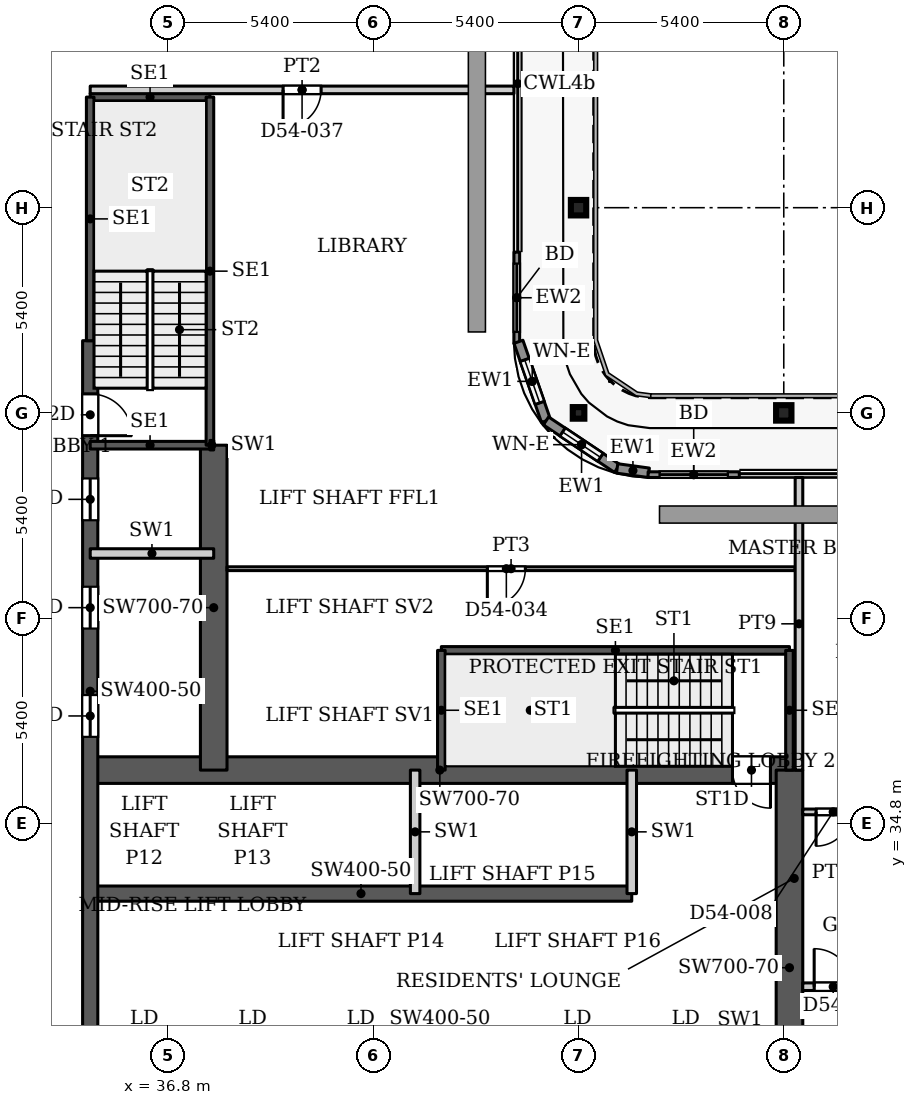
"""IFC4 building model, lengths in metres.
Left out: names, types, materials, properties, quantities, classifications, styles, units other than length and angle.
Written with IfcOpenShell. Run it as: python <this file> out.ifc"""

import sys

from ifc_helpers import new_model, si_unit, direction, frame, frame_2d, origin, origin_2d, place, context, subcontext, project, spatial, rectangle, hollow_rectangle, i_section, extrude, source, transform, mapped, element, fill, save


model = new_model("IFC4")
c1 = context("Model", 3, precision=1e-05, world=origin(), true_north=direction((0.0, 1.0)))
c2 = subcontext(c1, "Body", "Model", "MODEL_VIEW")
j1 = project(units=[si_unit("LENGTHUNIT", "METRE"), si_unit("PLANEANGLEUNIT", "RADIAN")], contexts=[c1])
p1 = place(None, origin())
s1 = spatial("IfcSite", under=j1, at=p1, CompositionType="ELEMENT")
p2 = place(p1, origin())
s2 = spatial("IfcBuilding", under=s1, at=p2, CompositionType="ELEMENT")
p3 = place(p2, frame((0.0, 0.0, 235.7)))
s3 = spatial("IfcBuildingStorey", under=s2, at=p3, CompositionType="ELEMENT", Elevation=235.7)
for number, where, z_axis, x_axis in (
    (1, (53.0, 45.6, 0.0), (0.0, 0.0, 1.0), (1.0, 0.0, 0.0)),
    (2, (47.6, 51.0, 0.0), (0.0, 0.0, 1.0), (1.0, 0.0, 0.0)),
):
    element("IfcColumn", number, at=place(p3, frame(where, z_axis=z_axis, x_axis=x_axis)), inside=s3, PredefinedType="COLUMN", context=c2, shape_type="SweptSolid", body=[
        extrude(i_section(OverallWidth=0.404, OverallDepth=0.407, WebThickness=0.027, FlangeThickness=0.044, FilletRadius=0.012, at=origin_2d()), origin(), (0.0, 0.0, 1.0), 3.9),
    ])
p4 = place(p3, frame((47.6, 45.6, 0.0), z_axis=(0.0, 0.0, 1.0), x_axis=(1.0, 0.0, 0.0)))
e3 = element("IfcColumn", 3, at=p4, inside=s3, PredefinedType="COLUMN", context=c2, shape_type="SweptSolid", body=[
    extrude(hollow_rectangle(XDim=0.305, YDim=0.305, WallThickness=0.016, InnerFilletRadius=0.016, OuterFilletRadius=0.032, at=origin_2d()), origin(), (0.0, 0.0, 1.0), 3.9),
])
p5 = place(p3, frame((34.75, 32.95, 0.0), z_axis=(0.0, 0.0, 1.0), x_axis=(1.0, 0.0, 0.0)))
e4 = element("IfcWall", 4, at=p5, inside=s3, PredefinedType="SHEAR", context=c2, shape_type="SweptSolid", body=[
    extrude(rectangle(XDim=14.25, YDim=0.4, at=frame_2d((7.125, 0.0))), origin(), (0.0, 0.0, 1.0), 3.9),
])
p6 = place(p3, frame((34.75, 36.2, 0.0), z_axis=(0.0, 0.0, 1.0), x_axis=(1.0, 0.0, 0.0)))
e5 = element("IfcWall", 5, at=p6, inside=s3, PredefinedType="SHEAR", context=c2, shape_type="SweptSolid", body=[
    extrude(rectangle(XDim=18.4, YDim=0.7, at=frame_2d((9.2, 0.0))), origin(), (0.0, 0.0, 1.0), 3.9),
])
p7 = place(p6, frame((16.9, 0.0, 0.0)))
e6 = element("IfcOpeningElement", 6, at=p7, cuts=e5, PredefinedType="OPENING", context=c2, shape_type="SweptSolid", body=[
    extrude(rectangle(XDim=1.0, YDim=2.2, at=frame_2d((0.5, 1.1))), frame((0.0, 0.36, 0.0), z_axis=(0.0, -1.0, 0.0), x_axis=(1.0, 0.0, 0.0)), (0.0, 0.0, 1.0), 0.72),
])
p8 = place(p3, frame((34.75, 29.05, 0.0), z_axis=(0.0, 0.0, 1.0), x_axis=(0.0, 1.0, 0.0)))
e7 = element("IfcWall", 7, at=p8, inside=s3, PredefinedType="SHEAR", context=c2, shape_type="SweptSolid", body=[
    extrude(rectangle(XDim=18.45, YDim=0.4, at=frame_2d((9.225, 0.0))), origin(), (0.0, 0.0, 1.0), 3.9),
])
p9 = place(p8, frame((8.025, 0.0, 0.0)))
e8 = element("IfcOpeningElement", 8, at=p9, cuts=e7, PredefinedType="OPENING", context=c2, shape_type="SweptSolid", body=[
    extrude(rectangle(XDim=1.1, YDim=2.2, at=frame_2d((0.55, 1.1))), frame((0.0, 0.21, 0.0), z_axis=(0.0, -1.0, 0.0), x_axis=(1.0, 0.0, 0.0)), (0.0, 0.0, 1.0), 0.42),
])
p10 = place(p8, frame((10.875, 0.0, 0.0)))
e9 = element("IfcOpeningElement", 9, at=p10, cuts=e7, PredefinedType="OPENING", context=c2, shape_type="SweptSolid", body=[
    extrude(rectangle(XDim=1.1, YDim=2.2, at=frame_2d((0.55, 1.1))), frame((0.0, 0.21, 0.0), z_axis=(0.0, -1.0, 0.0), x_axis=(1.0, 0.0, 0.0)), (0.0, 0.0, 1.0), 0.42),
])
p11 = place(p8, frame((13.725, 0.0, 0.0)))
e10 = element("IfcOpeningElement", 10, at=p11, cuts=e7, PredefinedType="OPENING", context=c2, shape_type="SweptSolid", body=[
    extrude(rectangle(XDim=1.1, YDim=2.2, at=frame_2d((0.55, 1.1))), frame((0.0, 0.21, 0.0), z_axis=(0.0, -1.0, 0.0), x_axis=(1.0, 0.0, 0.0)), (0.0, 0.0, 1.0), 0.42),
])
p12 = place(p8, frame((15.95, 0.0, 0.0)))
e11 = element("IfcOpeningElement", 11, at=p12, cuts=e7, PredefinedType="OPENING", context=c2, shape_type="SweptSolid", body=[
    extrude(rectangle(XDim=1.1, YDim=2.2, at=frame_2d((0.55, 1.1))), frame((0.0, 0.21, 0.0), z_axis=(0.0, -1.0, 0.0), x_axis=(1.0, 0.0, 0.0)), (0.0, 0.0, 1.0), 0.42),
])
p13 = place(p3, frame((38.0, 36.2, 0.0), z_axis=(0.0, 0.0, 1.0), x_axis=(0.0, 1.0, 0.0)))
e12 = element("IfcWall", 12, at=p13, inside=s3, PredefinedType="SHEAR", context=c2, shape_type="SweptSolid", body=[
    extrude(rectangle(XDim=8.55, YDim=0.7, at=frame_2d((4.275, 0.0))), origin(), (0.0, 0.0, 1.0), 3.9),
])
p14 = place(p3, frame((53.15, 25.8, 0.0), z_axis=(0.0, 0.0, 1.0), x_axis=(0.0, 1.0, 0.0)))
e13 = element("IfcWall", 13, at=p14, inside=s3, PredefinedType="SHEAR", context=c2, shape_type="SweptSolid", body=[
    extrude(rectangle(XDim=10.4, YDim=0.7, at=frame_2d((5.2, 0.0))), origin(), (0.0, 0.0, 1.0), 3.9),
])
p15 = place(p3, frame((45.975, 49.83, 0.0), z_axis=(0.0, 0.0, 1.0), x_axis=(0.0, -1.0, 0.0)))
e14 = element("IfcWall", 14, at=p15, inside=s3, PredefinedType="SOLIDWALL", context=c2, shape_type="SweptSolid", body=[
    extrude(rectangle(XDim=2.4, YDim=0.15, at=frame_2d((1.2, 0.0))), origin(), (0.0, 0.0, 1.0), 3.75),
])
p16 = place(p15, frame((0.3, 0.0, 0.0)))
e15 = element("IfcOpeningElement", 15, at=p16, cuts=e14, PredefinedType="OPENING", context=c2, shape_type="SweptSolid", body=[
    extrude(rectangle(XDim=1.8, YDim=2.4, at=frame_2d((0.9, 1.2))), frame((0.0, 0.085, 0.0), z_axis=(0.0, -1.0, 0.0), x_axis=(1.0, 0.0, 0.0)), (0.0, 0.0, 1.0), 0.17),
])
p17 = place(p3, frame((46.018, 47.471, 0.0), z_axis=(0.0, 0.0, 1.0), x_axis=(0.328791208903, -0.944402637093, 0.0)))
e16 = element("IfcWall", 16, at=p17, inside=s3, PredefinedType="SOLIDWALL", context=c2, shape_type="SweptSolid", body=[
    extrude(rectangle(XDim=2.205, YDim=0.25, at=frame_2d((1.102, 0.0))), origin(), (0.0, 0.0, 1.0), 3.75),
])
p18 = place(p17, frame((0.503, 0.0, 0.6)))
e17 = element("IfcOpeningElement", 17, at=p18, cuts=e16, PredefinedType="OPENING", context=c2, shape_type="SweptSolid", body=[
    extrude(rectangle(XDim=1.2, YDim=2.1, at=frame_2d((0.6, 1.05))), frame((0.0, 0.135, 0.0), z_axis=(0.0, -1.0, 0.0), x_axis=(1.0, 0.0, 0.0)), (0.0, 0.0, 1.0), 0.27),
])
p19 = place(p3, frame((46.743, 45.389, 0.0), z_axis=(0.0, 0.0, 1.0), x_axis=(0.831449265529, -0.555600682912, 0.0)))
e18 = element("IfcWall", 18, at=p19, inside=s3, PredefinedType="SOLIDWALL", context=c2, shape_type="SweptSolid", body=[
    extrude(rectangle(XDim=2.251, YDim=0.25, at=frame_2d((1.126, 0.0))), origin(), (0.0, 0.0, 1.0), 3.75),
])
p20 = place(p19, frame((0.525, 0.0, 0.6)))
e19 = element("IfcOpeningElement", 19, at=p20, cuts=e18, PredefinedType="OPENING", context=c2, shape_type="SweptSolid", body=[
    extrude(rectangle(XDim=1.2, YDim=2.1, at=frame_2d((0.6, 1.05))), frame((0.0, 0.135, 0.0), z_axis=(0.0, -1.0, 0.0), x_axis=(1.0, 0.0, 0.0)), (0.0, 0.0, 1.0), 0.27),
])
p21 = place(p3, frame((48.615, 44.138, 0.0), z_axis=(0.0, 0.0, 1.0), x_axis=(0.990741504246, -0.135761819977, 0.0)))
e20 = element("IfcWall", 20, at=p21, inside=s3, PredefinedType="SOLIDWALL", context=c2, shape_type="SweptSolid", body=[
    extrude(rectangle(XDim=0.84, YDim=0.25, at=frame_2d((0.42, 0.0))), origin(), (0.0, 0.0, 1.0), 3.75),
])
p22 = place(p3, frame((49.43, 43.975, 0.0), z_axis=(0.0, 0.0, 1.0), x_axis=(1.0, 0.0, 0.0)))
e21 = element("IfcWall", 21, at=p22, inside=s3, PredefinedType="SOLIDWALL", context=c2, shape_type="SweptSolid", body=[
    extrude(rectangle(XDim=2.4, YDim=0.15, at=frame_2d((1.2, 0.0))), origin(), (0.0, 0.0, 1.0), 3.75),
])
p23 = place(p22, frame((0.3, 0.0, 0.0)))
e22 = element("IfcOpeningElement", 22, at=p23, cuts=e21, PredefinedType="OPENING", context=c2, shape_type="SweptSolid", body=[
    extrude(rectangle(XDim=1.8, YDim=2.4, at=frame_2d((0.9, 1.2))), frame((0.0, 0.085, 0.0), z_axis=(0.0, -1.0, 0.0), x_axis=(1.0, 0.0, 0.0)), (0.0, 0.0, 1.0), 0.17),
])
p24 = place(p3, frame((43.99, 39.35, 0.0), z_axis=(0.0, 0.0, 1.0), x_axis=(1.0, 0.0, 0.0)))
e23 = element("IfcWall", 23, at=p24, inside=s3, PredefinedType="SHEAR", context=c2, shape_type="SweptSolid", body=[
    extrude(rectangle(XDim=9.16, YDim=0.2, at=frame_2d((4.58, 0.0))), origin(), (0.0, 0.0, 1.0), 3.9),
])
for number, where, z_axis, x_axis in (
    (24, (43.99, 36.2, 0.0), (0.0, 0.0, 1.0), (0.0, 1.0, 0.0)),
    (25, (53.15, 36.2, 0.0), (0.0, 0.0, 1.0), (0.0, 1.0, 0.0)),
):
    element("IfcWall", number, at=place(p3, frame(where, z_axis=z_axis, x_axis=x_axis)), inside=s3, PredefinedType="SHEAR", context=c2, shape_type="SweptSolid", body=[
        extrude(rectangle(XDim=3.15, YDim=0.2, at=frame_2d((1.575, 0.0))), origin(), (0.0, 0.0, 1.0), 3.9),
    ])
for number, where, z_axis, x_axis in (
    (26, (34.75, 44.75, 0.0), (0.0, 0.0, 1.0), (1.0, 0.0, 0.0)),
    (27, (34.75, 53.91, 0.0), (0.0, 0.0, 1.0), (1.0, 0.0, 0.0)),
):
    element("IfcWall", number, at=place(p3, frame(where, z_axis=z_axis, x_axis=x_axis)), inside=s3, PredefinedType="SHEAR", context=c2, shape_type="SweptSolid", body=[
        extrude(rectangle(XDim=3.15, YDim=0.2, at=frame_2d((1.575, 0.0))), origin(), (0.0, 0.0, 1.0), 3.9),
    ])
p25 = place(p3, frame((34.75, 47.5, 0.0), z_axis=(0.0, 0.0, 1.0), x_axis=(0.0, 1.0, 0.0)))
e28 = element("IfcWall", 28, at=p25, inside=s3, PredefinedType="SHEAR", context=c2, shape_type="SweptSolid", body=[
    extrude(rectangle(XDim=6.41, YDim=0.2, at=frame_2d((3.205, 0.0))), origin(), (0.0, 0.0, 1.0), 3.9),
])
p26 = place(p3, frame((37.9, 44.75, 0.0), z_axis=(0.0, 0.0, 1.0), x_axis=(0.0, 1.0, 0.0)))
e29 = element("IfcWall", 29, at=p26, inside=s3, PredefinedType="SHEAR", context=c2, shape_type="SweptSolid", body=[
    extrude(rectangle(XDim=9.16, YDim=0.2, at=frame_2d((4.58, 0.0))), origin(), (0.0, 0.0, 1.0), 3.9),
])
for number, where, z_axis, x_axis in (
    (30, (43.3, 32.95, 0.0), (0.0, 0.0, 1.0), (0.0, 1.0, 0.0)),
    (31, (49.0, 32.95, 0.0), (0.0, 0.0, 1.0), (0.0, 1.0, 0.0)),
    (32, (34.75, 41.9, 0.0), (0.0, 0.0, 1.0), (1.0, 0.0, 0.0)),
):
    element("IfcWall", number, at=place(p3, frame(where, z_axis=z_axis, x_axis=x_axis)), inside=s3, PredefinedType="PARTITIONING", context=c2, shape_type="SweptSolid", body=[
        extrude(rectangle(XDim=3.25, YDim=0.25, at=frame_2d((1.625, 0.0))), origin(), (0.0, 0.0, 1.0), 3.9),
    ])
p27 = place(p3, frame((37.9, 44.75, 0.0), z_axis=(0.0, 0.0, 1.0), x_axis=(1.0, 0.0, 0.0)))
e33 = element("IfcWall", 33, at=p27, inside=s3, PredefinedType="PARTITIONING", context=c2, shape_type="SweptSolid", body=[
    extrude(rectangle(XDim=0.1, YDim=0.25, at=frame_2d((0.05, 0.0))), origin(), (0.0, 0.0, 1.0), 3.9),
])
p28 = place(p3, frame((34.75, 54.1, 0.0), z_axis=(0.0, 0.0, 1.0), x_axis=(1.0, 0.0, 0.0)))
e34 = element("IfcWall", 34, at=p28, inside=s3, PredefinedType="PARTITIONING", context=c2, shape_type="SweptSolid", body=[
    extrude(rectangle(XDim=11.15, YDim=0.2, at=frame_2d((5.575, 0.0))), origin(), (0.0, 0.0, 1.0), 3.6),
])
p29 = place(p28, frame((5.075, 0.0, 0.0)))
e35 = element("IfcOpeningElement", 35, at=p29, cuts=e34, PredefinedType="OPENING", context=c2, shape_type="SweptSolid", body=[
    extrude(rectangle(XDim=1.0, YDim=2.1, at=frame_2d((0.5, 1.05))), frame((0.0, 0.11, 0.0), z_axis=(0.0, -1.0, 0.0), x_axis=(1.0, 0.0, 0.0)), (0.0, 0.0, 1.0), 0.22),
])
p30 = place(p3, frame((38.349, 41.5, 0.0), z_axis=(0.0, 0.0, 1.0), x_axis=(1.0, 0.0, 0.0)))
e36 = element("IfcWall", 36, at=p30, inside=s3, PredefinedType="PARTITIONING", context=c2, shape_type="SweptSolid", body=[
    extrude(rectangle(XDim=14.951, YDim=0.1, at=frame_2d((7.476, 0.0))), origin(), (0.0, 0.0, 1.0), 3.6),
])
p31 = place(p30, frame((6.851, 0.0, 0.0)))
e37 = element("IfcOpeningElement", 37, at=p31, cuts=e36, PredefinedType="OPENING", context=c2, shape_type="SweptSolid", body=[
    extrude(rectangle(XDim=1.0, YDim=2.1, at=frame_2d((0.5, 1.05))), frame((0.0, 0.06, 0.0), z_axis=(0.0, -1.0, 0.0), x_axis=(1.0, 0.0, 0.0)), (0.0, 0.0, 1.0), 0.12),
])
p32 = place(p3, frame((53.4, 36.199, 0.0), z_axis=(0.0, 0.0, 1.0), x_axis=(0.0, 1.0, 0.0)))
e38 = element("IfcWall", 38, at=p32, inside=s3, PredefinedType="PARTITIONING", context=c2, shape_type="SweptSolid", body=[
    extrude(rectangle(XDim=7.701, YDim=0.2, at=frame_2d((3.851, 0.0))), origin(), (0.0, 0.0, 1.0), 3.6),
])
p33 = place(p3, frame((53.499, 30.5, 0.0), z_axis=(0.0, 0.0, 1.0), x_axis=(1.0, 0.0, 0.0)))
e39 = element("IfcWall", 39, at=p33, inside=s3, PredefinedType="PARTITIONING", context=c2, shape_type="SweptSolid", body=[
    extrude(rectangle(XDim=28.401, YDim=0.2, at=frame_2d((14.2, 0.0))), origin(), (0.0, 0.0, 1.0), 3.6),
])
p34 = place(p33, frame((0.301, 0.0, 0.0)))
e40 = element("IfcOpeningElement", 40, at=p34, cuts=e39, PredefinedType="OPENING", context=c2, shape_type="SweptSolid", body=[
    extrude(rectangle(XDim=1.0, YDim=2.1, at=frame_2d((0.5, 1.05))), frame((0.0, 0.11, 0.0), z_axis=(0.0, -1.0, 0.0), x_axis=(1.0, 0.0, 0.0)), (0.0, 0.0, 1.0), 0.22),
])
p35 = place(p33, frame((18.151, 0.0, 0.0)))
e41 = element("IfcOpeningElement", 41, at=p35, cuts=e39, PredefinedType="OPENING", context=c2, shape_type="SweptSolid", body=[
    extrude(rectangle(XDim=1.0, YDim=2.1, at=frame_2d((0.5, 1.05))), frame((0.0, 0.11, 0.0), z_axis=(0.0, -1.0, 0.0), x_axis=(1.0, 0.0, 0.0)), (0.0, 0.0, 1.0), 0.22),
])
p36 = place(p33, frame((25.801, 0.0, 0.0)))
e42 = element("IfcOpeningElement", 42, at=p36, cuts=e39, PredefinedType="OPENING", context=c2, shape_type="SweptSolid", body=[
    extrude(rectangle(XDim=1.0, YDim=2.1, at=frame_2d((0.5, 1.05))), frame((0.0, 0.11, 0.0), z_axis=(0.0, -1.0, 0.0), x_axis=(1.0, 0.0, 0.0)), (0.0, 0.0, 1.0), 0.22),
])
p37 = place(p3, frame((53.499, 35.1, 0.0), z_axis=(0.0, 0.0, 1.0), x_axis=(1.0, 0.0, 0.0)))
e43 = element("IfcWall", 43, at=p37, inside=s3, PredefinedType="PARTITIONING", context=c2, shape_type="SweptSolid", body=[
    extrude(rectangle(XDim=11.501, YDim=0.15, at=frame_2d((5.75, 0.0))), origin(), (0.0, 0.0, 1.0), 3.6),
])
p38 = place(p37, frame((5.001, 0.0, 0.0)))
e44 = element("IfcOpeningElement", 44, at=p38, cuts=e43, PredefinedType="OPENING", context=c2, shape_type="SweptSolid", body=[
    extrude(rectangle(XDim=0.9, YDim=2.1, at=frame_2d((0.45, 1.05))), frame((0.0, 0.085, 0.0), z_axis=(0.0, -1.0, 0.0), x_axis=(1.0, 0.0, 0.0)), (0.0, 0.0, 1.0), 0.17),
])
p39 = place(p37, frame((8.851, 0.0, 0.0)))
e45 = element("IfcOpeningElement", 45, at=p39, cuts=e43, PredefinedType="OPENING", context=c2, shape_type="SweptSolid", body=[
    extrude(rectangle(XDim=1.0, YDim=2.1, at=frame_2d((0.5, 1.05))), frame((0.0, 0.085, 0.0), z_axis=(0.0, -1.0, 0.0), x_axis=(1.0, 0.0, 0.0)), (0.0, 0.0, 1.0), 0.17),
])
p40 = place(p37, frame((0.351, 0.0, 0.0)))
e46 = element("IfcOpeningElement", 46, at=p40, cuts=e43, PredefinedType="OPENING", context=c2, shape_type="SweptSolid", body=[
    extrude(rectangle(XDim=0.9, YDim=2.1, at=frame_2d((0.45, 1.05))), frame((0.0, 0.085, 0.0), z_axis=(0.0, -1.0, 0.0), x_axis=(1.0, 0.0, 0.0)), (0.0, 0.0, 1.0), 0.17),
])
m1 = source(origin(), c2, "Body", "SweptSolid", [
    extrude(rectangle(XDim=1.8, YDim=2.4, at=frame_2d((0.9, 1.2))), frame((0.0, 0.025, 0.0), z_axis=(0.0, -1.0, 0.0), x_axis=(1.0, 0.0, 0.0)), (0.0, 0.0, 1.0), 0.05),
])
p41 = place(p16, origin())
e47 = element("IfcDoor", 47, at=p41, inside=s3, OperationType="SLIDING_TO_LEFT", PredefinedType="DOOR", context=c2, shape_type="MappedRepresentation", body=[
    mapped(m1, transform((0.0, 0.0, 0.0), x_axis=(1.0, 0.0, 0.0), y_axis=(0.0, 1.0, 0.0), z_axis=(0.0, 0.0, 1.0), scale=1.0)),
])
fill(e15, e47)
m2 = source(origin(), c2, "Body", "SweptSolid", [
    extrude(rectangle(XDim=1.2, YDim=2.1, at=frame_2d((0.6, 1.05))), frame((0.0, 0.03, 0.0), z_axis=(0.0, -1.0, 0.0), x_axis=(1.0, 0.0, 0.0)), (0.0, 0.0, 1.0), 0.06),
])
p42 = place(p18, origin())
e48 = element("IfcWindow", 48, at=p42, inside=s3, PartitioningType="SINGLE_PANEL", PredefinedType="WINDOW", context=c2, shape_type="MappedRepresentation", body=[
    mapped(m2, transform((0.0, 0.0, 0.0), x_axis=(1.0, 0.0, 0.0), y_axis=(0.0, 1.0, 0.0), z_axis=(0.0, 0.0, 1.0), scale=1.0)),
])
fill(e17, e48)
p43 = place(p20, origin())
e49 = element("IfcWindow", 49, at=p43, inside=s3, PartitioningType="SINGLE_PANEL", PredefinedType="WINDOW", context=c2, shape_type="MappedRepresentation", body=[
    mapped(m2, transform((0.0, 0.0, 0.0), x_axis=(1.0, 0.0, 0.0), y_axis=(0.0, 1.0, 0.0), z_axis=(0.0, 0.0, 1.0), scale=1.0)),
])
fill(e19, e49)
p44 = place(p23, origin())
e50 = element("IfcDoor", 50, at=p44, inside=s3, OperationType="SLIDING_TO_LEFT", PredefinedType="DOOR", context=c2, shape_type="MappedRepresentation", body=[
    mapped(m1, transform((0.0, 0.0, 0.0), x_axis=(1.0, 0.0, 0.0), y_axis=(0.0, 1.0, 0.0), z_axis=(0.0, 0.0, 1.0), scale=1.0)),
])
fill(e22, e50)
m3 = source(origin(), c2, "Body", "SweptSolid", [
    extrude(rectangle(XDim=1.1, YDim=2.2, at=frame_2d((0.55, 1.1))), frame((0.0, 0.025, 0.0), z_axis=(0.0, -1.0, 0.0), x_axis=(1.0, 0.0, 0.0)), (0.0, 0.0, 1.0), 0.05),
])
p45 = place(p9, origin())
e51 = element("IfcDoor", 51, at=p45, inside=s3, OperationType="SLIDING_TO_LEFT", PredefinedType="DOOR", context=c2, shape_type="MappedRepresentation", body=[
    mapped(m3, transform((0.0, 0.0, 0.0), x_axis=(1.0, 0.0, 0.0), y_axis=(0.0, 1.0, 0.0), z_axis=(0.0, 0.0, 1.0), scale=1.0)),
])
fill(e8, e51)
p46 = place(p10, origin())
e52 = element("IfcDoor", 52, at=p46, inside=s3, OperationType="SLIDING_TO_LEFT", PredefinedType="DOOR", context=c2, shape_type="MappedRepresentation", body=[
    mapped(m3, transform((0.0, 0.0, 0.0), x_axis=(1.0, 0.0, 0.0), y_axis=(0.0, 1.0, 0.0), z_axis=(0.0, 0.0, 1.0), scale=1.0)),
])
fill(e9, e52)
p47 = place(p11, origin())
e53 = element("IfcDoor", 53, at=p47, inside=s3, OperationType="SLIDING_TO_LEFT", PredefinedType="DOOR", context=c2, shape_type="MappedRepresentation", body=[
    mapped(m3, transform((0.0, 0.0, 0.0), x_axis=(1.0, 0.0, 0.0), y_axis=(0.0, 1.0, 0.0), z_axis=(0.0, 0.0, 1.0), scale=1.0)),
])
fill(e10, e53)
m4 = source(origin(), c2, "Body", "SweptSolid", [
    extrude(rectangle(XDim=1.0, YDim=2.2, at=frame_2d((0.5, 1.1))), frame((0.0, 0.025, 0.0), z_axis=(0.0, -1.0, 0.0), x_axis=(1.0, 0.0, 0.0)), (0.0, 0.0, 1.0), 0.05),
])
p48 = place(p7, origin())
e54 = element("IfcDoor", 54, at=p48, inside=s3, OperationType="SINGLE_SWING_RIGHT", PredefinedType="DOOR", context=c2, shape_type="MappedRepresentation", body=[
    mapped(m4, transform((0.0, 0.0, 0.0), x_axis=(1.0, 0.0, 0.0), y_axis=(0.0, 1.0, 0.0), z_axis=(0.0, 0.0, 1.0), scale=1.0)),
])
fill(e6, e54)
m5 = source(origin(), c2, "Body", "SweptSolid", [
    extrude(rectangle(XDim=1.1, YDim=2.2, at=frame_2d((0.55, 1.1))), frame((0.0, 0.025, 0.0), z_axis=(0.0, -1.0, 0.0), x_axis=(1.0, 0.0, 0.0)), (0.0, 0.0, 1.0), 0.05),
])
p49 = place(p12, origin())
e55 = element("IfcDoor", 55, at=p49, inside=s3, OperationType="SINGLE_SWING_RIGHT", PredefinedType="DOOR", context=c2, shape_type="MappedRepresentation", body=[
    mapped(m5, transform((0.0, 0.0, 0.0), x_axis=(1.0, 0.0, 0.0), y_axis=(0.0, 1.0, 0.0), z_axis=(0.0, 0.0, 1.0), scale=1.0)),
])
fill(e11, e55)
m6 = source(origin(), c2, "Body", "SweptSolid", [
    extrude(rectangle(XDim=1.0, YDim=2.1, at=frame_2d((0.5, 1.05))), frame((0.0, 0.025, 0.0), z_axis=(0.0, -1.0, 0.0), x_axis=(1.0, 0.0, 0.0)), (0.0, 0.0, 1.0), 0.05),
])
p50 = place(p34, origin())
e56 = element("IfcDoor", 56, at=p50, inside=s3, OperationType="SINGLE_SWING_LEFT", PredefinedType="DOOR", context=c2, shape_type="MappedRepresentation", body=[
    mapped(m6, transform((0.0, 0.0, 0.0), x_axis=(1.0, 0.0, 0.0), y_axis=(0.0, 1.0, 0.0), z_axis=(0.0, 0.0, 1.0), scale=1.0)),
])
fill(e40, e56)
m7 = source(origin(), c2, "Body", "SweptSolid", [
    extrude(rectangle(XDim=0.9, YDim=2.1, at=frame_2d((0.45, 1.05))), frame((0.0, 0.025, 0.0), z_axis=(0.0, -1.0, 0.0), x_axis=(1.0, 0.0, 0.0)), (0.0, 0.0, 1.0), 0.05),
])
p51 = place(p40, origin())
e57 = element("IfcDoor", 57, at=p51, inside=s3, OperationType="SINGLE_SWING_RIGHT", PredefinedType="DOOR", context=c2, shape_type="MappedRepresentation", body=[
    mapped(m7, transform((0.0, 0.0, 0.0), x_axis=(1.0, 0.0, 0.0), y_axis=(0.0, 1.0, 0.0), z_axis=(0.0, 0.0, 1.0), scale=1.0)),
])
fill(e46, e57)
m8 = source(origin(), c2, "Body", "SweptSolid", [
    extrude(rectangle(XDim=1.0, YDim=2.1, at=frame_2d((0.5, 1.05))), frame((0.0, 0.025, 0.0), z_axis=(0.0, -1.0, 0.0), x_axis=(1.0, 0.0, 0.0)), (0.0, 0.0, 1.0), 0.05),
])
p52 = place(p31, origin())
e58 = element("IfcDoor", 58, at=p52, inside=s3, OperationType="SINGLE_SWING_RIGHT", PredefinedType="DOOR", context=c2, shape_type="MappedRepresentation", body=[
    mapped(m8, transform((0.0, 0.0, 0.0), x_axis=(1.0, 0.0, 0.0), y_axis=(0.0, 1.0, 0.0), z_axis=(0.0, 0.0, 1.0), scale=1.0)),
])
fill(e37, e58)
m9 = source(origin(), c2, "Body", "SweptSolid", [
    extrude(rectangle(XDim=1.0, YDim=2.1, at=frame_2d((0.5, 1.05))), frame((0.0, 0.025, 0.0), z_axis=(0.0, -1.0, 0.0), x_axis=(1.0, 0.0, 0.0)), (0.0, 0.0, 1.0), 0.05),
])
p53 = place(p29, origin())
e59 = element("IfcDoor", 59, at=p53, inside=s3, OperationType="SINGLE_SWING_RIGHT", PredefinedType="DOOR", context=c2, shape_type="MappedRepresentation", body=[
    mapped(m9, transform((0.0, 0.0, 0.0), x_axis=(1.0, 0.0, 0.0), y_axis=(0.0, 1.0, 0.0), z_axis=(0.0, 0.0, 1.0), scale=1.0)),
])
fill(e35, e59)
save(model, sys.argv[1])
